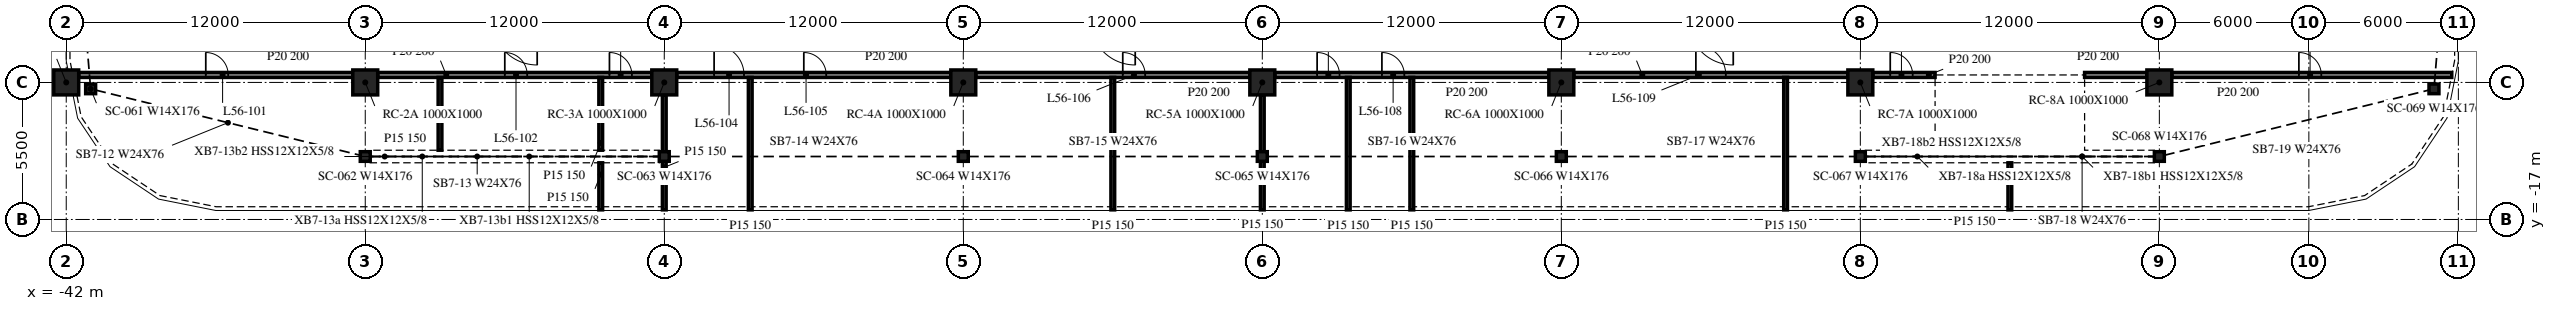
"""IFC4 building model, lengths in metres.
Left out: names, types, materials, properties, quantities, classifications, styles, units other than length and angle.
Written with IfcOpenShell. Run it as: python <this file> out.ifc"""

import sys

from ifc_helpers import new_model, si_unit, direction, frame, frame_2d, origin, origin_2d, place, context, subcontext, project, spatial, rectangle, i_section, extrude, element, fill, save


model = new_model("IFC4")
c1 = context("Model", 3, precision=1e-05, world=origin(), true_north=direction((0.0, 1.0)))
c2 = subcontext(c1, "Body", "Model", "MODEL_VIEW")
j1 = project(units=[si_unit("LENGTHUNIT", "METRE"), si_unit("PLANEANGLEUNIT", "RADIAN")], contexts=[c1])
p1 = place(None, origin())
s1 = spatial("IfcSite", under=j1, at=p1, CompositionType="ELEMENT")
p2 = place(p1, origin())
s2 = spatial("IfcBuilding", under=s1, at=p2, CompositionType="ELEMENT")
p3 = place(p2, frame((0.0, 0.0, 232.4)))
s3 = spatial("IfcBuildingStorey", under=s2, at=p3, CompositionType="ELEMENT", Elevation=232.4)
for number, where, z_axis, x_axis in (
    (1, (-42.0, -11.5, -0.34), (0.0, 0.0, 1.0), (1.0, 0.0, 0.0)),
    (2, (-30.0, -11.5, -0.34), (0.0, 0.0, 1.0), (1.0, 0.0, 0.0)),
    (3, (-18.0, -11.5, -0.34), (0.0, 0.0, 1.0), (1.0, 0.0, 0.0)),
    (4, (-6.0, -11.5, -0.34), (0.0, 0.0, 1.0), (1.0, 0.0, 0.0)),
    (5, (6.0, -11.5, -0.34), (0.0, 0.0, 1.0), (1.0, 0.0, 0.0)),
    (6, (18.0, -11.5, -0.34), (0.0, 0.0, 1.0), (1.0, 0.0, 0.0)),
    (7, (30.0, -11.5, -0.34), (0.0, 0.0, 1.0), (1.0, 0.0, 0.0)),
    (8, (42.0, -11.5, -0.34), (0.0, 0.0, 1.0), (1.0, 0.0, 0.0)),
):
    element("IfcColumn", number, at=place(p3, frame(where, z_axis=z_axis, x_axis=x_axis)), inside=s3, PredefinedType="COLUMN", context=c2, shape_type="SweptSolid", body=[
        extrude(rectangle(XDim=1.0, YDim=1.0, at=origin_2d()), origin(), (0.0, 0.0, 1.0), 3.8),
    ])
for number, where, z_axis, x_axis in (
    (9, (-41.021, -11.758, -0.34), (0.0, 0.0, 1.0), (1.0, 0.0, 0.0)),
    (10, (-30.0, -14.473, -0.34), (0.0, 0.0, 1.0), (1.0, 0.0, 0.0)),
    (11, (-18.0, -14.473, -0.34), (0.0, 0.0, 1.0), (1.0, 0.0, 0.0)),
    (12, (-6.0, -14.473, -0.34), (0.0, 0.0, 1.0), (1.0, 0.0, 0.0)),
    (13, (6.0, -14.473, -0.34), (0.0, 0.0, 1.0), (1.0, 0.0, 0.0)),
    (14, (18.0, -14.473, -0.34), (0.0, 0.0, 1.0), (1.0, 0.0, 0.0)),
    (15, (30.0, -14.473, -0.34), (0.0, 0.0, 1.0), (1.0, 0.0, 0.0)),
    (16, (42.0, -14.473, -0.34), (0.0, 0.0, 1.0), (1.0, 0.0, 0.0)),
    (17, (53.021, -11.758, -0.34), (0.0, 0.0, 1.0), (1.0, 0.0, 0.0)),
):
    element("IfcColumn", number, at=place(p3, frame(where, z_axis=z_axis, x_axis=x_axis)), inside=s3, PredefinedType="COLUMN", context=c2, shape_type="SweptSolid", body=[
        extrude(i_section(OverallWidth=0.399, OverallDepth=0.386, WebThickness=0.021, FlangeThickness=0.033, at=origin_2d()), origin(), (0.0, 0.0, 1.0), 3.8),
    ])
p4 = place(p3, frame((-41.5, -11.2, 0.0), z_axis=(0.0, 0.0, 1.0), x_axis=(1.0, 0.0, 0.0)))
e18 = element("IfcWall", 18, at=p4, inside=s3, PredefinedType="PARTITIONING", context=c2, shape_type="SweptSolid", body=[
    extrude(rectangle(XDim=11.0, YDim=0.2, at=frame_2d((5.5, 0.0))), origin(), (0.0, 0.0, 1.0), 3.46),
])
p5 = place(p4, frame((5.1, 0.0, 0.0)))
e19 = element("IfcOpeningElement", 19, at=p5, cuts=e18, PredefinedType="OPENING", context=c2, shape_type="SweptSolid", body=[
    extrude(rectangle(XDim=0.9, YDim=2.1, at=frame_2d((0.45, 1.05))), frame((0.0, 0.11, 0.0), z_axis=(0.0, -1.0, 0.0), x_axis=(1.0, 0.0, 0.0)), (0.0, 0.0, 1.0), 0.22),
])
p6 = place(p3, frame((-29.5, -11.2, 0.0), z_axis=(0.0, 0.0, 1.0), x_axis=(1.0, 0.0, 0.0)))
e20 = element("IfcWall", 20, at=p6, inside=s3, PredefinedType="PARTITIONING", context=c2, shape_type="SweptSolid", body=[
    extrude(rectangle(XDim=11.0, YDim=0.2, at=frame_2d((5.5, 0.0))), origin(), (0.0, 0.0, 1.0), 3.46),
])
p7 = place(p6, frame((5.1, 0.0, 0.0)))
e21 = element("IfcOpeningElement", 21, at=p7, cuts=e20, PredefinedType="OPENING", context=c2, shape_type="SweptSolid", body=[
    extrude(rectangle(XDim=0.9, YDim=2.1, at=frame_2d((0.45, 1.05))), frame((0.0, 0.11, 0.0), z_axis=(0.0, -1.0, 0.0), x_axis=(1.0, 0.0, 0.0)), (0.0, 0.0, 1.0), 0.22),
])
p8 = place(p6, frame((9.3, 0.0, 0.0)))
e22 = element("IfcOpeningElement", 22, at=p8, cuts=e20, PredefinedType="OPENING", context=c2, shape_type="SweptSolid", body=[
    extrude(rectangle(XDim=0.9, YDim=2.1, at=frame_2d((0.45, 1.05))), frame((0.0, 0.11, 0.0), z_axis=(0.0, -1.0, 0.0), x_axis=(1.0, 0.0, 0.0)), (0.0, 0.0, 1.0), 0.22),
])
p9 = place(p3, frame((-17.5, -11.2, 0.0), z_axis=(0.0, 0.0, 1.0), x_axis=(1.0, 0.0, 0.0)))
e23 = element("IfcWall", 23, at=p9, inside=s3, PredefinedType="PARTITIONING", context=c2, shape_type="SweptSolid", body=[
    extrude(rectangle(XDim=11.0, YDim=0.2, at=frame_2d((5.5, 0.0))), origin(), (0.0, 0.0, 1.0), 3.46),
])
p10 = place(p9, frame((1.5, 0.0, 0.0)))
e24 = element("IfcOpeningElement", 24, at=p10, cuts=e23, PredefinedType="OPENING", context=c2, shape_type="SweptSolid", body=[
    extrude(rectangle(XDim=1.2, YDim=2.1, at=frame_2d((0.6, 1.05))), frame((0.0, 0.11, 0.0), z_axis=(0.0, -1.0, 0.0), x_axis=(1.0, 0.0, 0.0)), (0.0, 0.0, 1.0), 0.22),
])
p11 = place(p9, frame((5.1, 0.0, 0.0)))
e25 = element("IfcOpeningElement", 25, at=p11, cuts=e23, PredefinedType="OPENING", context=c2, shape_type="SweptSolid", body=[
    extrude(rectangle(XDim=0.9, YDim=2.1, at=frame_2d((0.45, 1.05))), frame((0.0, 0.11, 0.0), z_axis=(0.0, -1.0, 0.0), x_axis=(1.0, 0.0, 0.0)), (0.0, 0.0, 1.0), 0.22),
])
p12 = place(p3, frame((-5.5, -11.2, 0.0), z_axis=(0.0, 0.0, 1.0), x_axis=(1.0, 0.0, 0.0)))
e26 = element("IfcWall", 26, at=p12, inside=s3, PredefinedType="PARTITIONING", context=c2, shape_type="SweptSolid", body=[
    extrude(rectangle(XDim=11.0, YDim=0.2, at=frame_2d((5.5, 0.0))), origin(), (0.0, 0.0, 1.0), 3.46),
])
p13 = place(p12, frame((5.9, 0.0, 0.0)))
e27 = element("IfcOpeningElement", 27, at=p13, cuts=e26, PredefinedType="OPENING", context=c2, shape_type="SweptSolid", body=[
    extrude(rectangle(XDim=0.9, YDim=2.1, at=frame_2d((0.45, 1.05))), frame((0.0, 0.11, 0.0), z_axis=(0.0, -1.0, 0.0), x_axis=(1.0, 0.0, 0.0)), (0.0, 0.0, 1.0), 0.22),
])
p14 = place(p3, frame((6.5, -11.2, 0.0), z_axis=(0.0, 0.0, 1.0), x_axis=(1.0, 0.0, 0.0)))
e28 = element("IfcWall", 28, at=p14, inside=s3, PredefinedType="PARTITIONING", context=c2, shape_type="SweptSolid", body=[
    extrude(rectangle(XDim=11.0, YDim=0.2, at=frame_2d((5.5, 0.0))), origin(), (0.0, 0.0, 1.0), 3.46),
])
p15 = place(p14, frame((1.7, 0.0, 0.0)))
e29 = element("IfcOpeningElement", 29, at=p15, cuts=e28, PredefinedType="OPENING", context=c2, shape_type="SweptSolid", body=[
    extrude(rectangle(XDim=0.9, YDim=2.1, at=frame_2d((0.45, 1.05))), frame((0.0, 0.11, 0.0), z_axis=(0.0, -1.0, 0.0), x_axis=(1.0, 0.0, 0.0)), (0.0, 0.0, 1.0), 0.22),
])
p16 = place(p14, frame((4.3, 0.0, 0.0)))
e30 = element("IfcOpeningElement", 30, at=p16, cuts=e28, PredefinedType="OPENING", context=c2, shape_type="SweptSolid", body=[
    extrude(rectangle(XDim=0.9, YDim=2.1, at=frame_2d((0.45, 1.05))), frame((0.0, 0.11, 0.0), z_axis=(0.0, -1.0, 0.0), x_axis=(1.0, 0.0, 0.0)), (0.0, 0.0, 1.0), 0.22),
])
p17 = place(p3, frame((18.5, -11.2, 0.0), z_axis=(0.0, 0.0, 1.0), x_axis=(1.0, 0.0, 0.0)))
e31 = element("IfcWall", 31, at=p17, inside=s3, PredefinedType="PARTITIONING", context=c2, shape_type="SweptSolid", body=[
    extrude(rectangle(XDim=11.0, YDim=0.2, at=frame_2d((5.5, 0.0))), origin(), (0.0, 0.0, 1.0), 3.46),
])
p18 = place(p17, frame((4.9, 0.0, 0.0)))
e32 = element("IfcOpeningElement", 32, at=p18, cuts=e31, PredefinedType="OPENING", context=c2, shape_type="SweptSolid", body=[
    extrude(rectangle(XDim=1.2, YDim=2.1, at=frame_2d((0.6, 1.05))), frame((0.0, 0.11, 0.0), z_axis=(0.0, -1.0, 0.0), x_axis=(1.0, 0.0, 0.0)), (0.0, 0.0, 1.0), 0.22),
])
p19 = place(p3, frame((30.5, -11.2, 0.0), z_axis=(0.0, 0.0, 1.0), x_axis=(1.0, 0.0, 0.0)))
e33 = element("IfcWall", 33, at=p19, inside=s3, PredefinedType="PARTITIONING", context=c2, shape_type="SweptSolid", body=[
    extrude(rectangle(XDim=2.5, YDim=0.2, at=frame_2d((1.25, 0.0))), origin(), (0.0, 0.0, 1.0), 3.46),
])
p20 = place(p19, frame((0.7, 0.0, 0.0)))
e34 = element("IfcOpeningElement", 34, at=p20, cuts=e33, PredefinedType="OPENING", context=c2, shape_type="SweptSolid", body=[
    extrude(rectangle(XDim=0.9, YDim=2.1, at=frame_2d((0.45, 1.05))), frame((0.0, 0.11, 0.0), z_axis=(0.0, -1.0, 0.0), x_axis=(1.0, 0.0, 0.0)), (0.0, 0.0, 1.0), 0.22),
])
p21 = place(p3, frame((39.0, -11.2, 0.0), z_axis=(0.0, 0.0, 1.0), x_axis=(1.0, 0.0, 0.0)))
e35 = element("IfcWall", 35, at=p21, inside=s3, PredefinedType="PARTITIONING", context=c2, shape_type="SweptSolid", body=[
    extrude(rectangle(XDim=2.5, YDim=0.2, at=frame_2d((1.25, 0.0))), origin(), (0.0, 0.0, 1.0), 3.46),
])
p22 = place(p3, frame((42.5, -11.2, 0.0), z_axis=(0.0, 0.0, 1.0), x_axis=(1.0, 0.0, 0.0)))
e36 = element("IfcWall", 36, at=p22, inside=s3, PredefinedType="PARTITIONING", context=c2, shape_type="SweptSolid", body=[
    extrude(rectangle(XDim=11.235, YDim=0.2, at=frame_2d((5.618, 0.0))), origin(), (0.0, 0.0, 1.0), 3.46),
])
p23 = place(p22, frame((5.1, 0.0, 0.0)))
e37 = element("IfcOpeningElement", 37, at=p23, cuts=e36, PredefinedType="OPENING", context=c2, shape_type="SweptSolid", body=[
    extrude(rectangle(XDim=0.9, YDim=2.1, at=frame_2d((0.45, 1.05))), frame((0.0, 0.11, 0.0), z_axis=(0.0, -1.0, 0.0), x_axis=(1.0, 0.0, 0.0)), (0.0, 0.0, 1.0), 0.22),
])
p24 = place(p3, frame((-27.0, -14.221, 0.0), z_axis=(0.0, 0.0, 1.0), x_axis=(0.0, 1.0, 0.0)))
e38 = element("IfcWall", 38, at=p24, inside=s3, PredefinedType="PARTITIONING", context=c2, shape_type="SweptSolid", body=[
    extrude(rectangle(XDim=2.921, YDim=0.15, at=frame_2d((1.46, 0.0))), origin(), (0.0, 0.0, 1.0), 3.46),
])
p25 = place(p3, frame((-20.55, -16.614, 0.0), z_axis=(0.0, 0.0, 1.0), x_axis=(0.0, 1.0, 0.0)))
e39 = element("IfcWall", 39, at=p25, inside=s3, PredefinedType="PARTITIONING", context=c2, shape_type="SweptSolid", body=[
    extrude(rectangle(XDim=1.889, YDim=0.15, at=frame_2d((0.944, 0.0))), origin(), (0.0, 0.0, 1.0), 3.46),
])
p26 = place(p3, frame((-20.55, -14.221, 0.0), z_axis=(0.0, 0.0, 1.0), x_axis=(0.0, 1.0, 0.0)))
e40 = element("IfcWall", 40, at=p26, inside=s3, PredefinedType="PARTITIONING", context=c2, shape_type="SweptSolid", body=[
    extrude(rectangle(XDim=2.921, YDim=0.15, at=frame_2d((1.46, 0.0))), origin(), (0.0, 0.0, 1.0), 3.46),
])
p27 = place(p3, frame((-18.0, -16.614, 0.0), z_axis=(0.0, 0.0, 1.0), x_axis=(0.0, 1.0, 0.0)))
e41 = element("IfcWall", 41, at=p27, inside=s3, PredefinedType="PARTITIONING", context=c2, shape_type="SweptSolid", body=[
    extrude(rectangle(XDim=4.614, YDim=0.15, at=frame_2d((2.307, 0.0))), origin(), (0.0, 0.0, 1.0), 3.46),
])
for number, where, z_axis, x_axis in (
    (42, (-14.55, -16.614, 0.0), (0.0, 0.0, 1.0), (0.0, 1.0, 0.0)),
    (43, (0.0, -16.614, 0.0), (0.0, 0.0, 1.0), (0.0, 1.0, 0.0)),
):
    element("IfcWall", number, at=place(p3, frame(where, z_axis=z_axis, x_axis=x_axis)), inside=s3, PredefinedType="PARTITIONING", context=c2, shape_type="SweptSolid", body=[
        extrude(rectangle(XDim=5.314, YDim=0.15, at=frame_2d((2.657, 0.0))), origin(), (0.0, 0.0, 1.0), 3.46),
    ])
p28 = place(p3, frame((6.0, -16.614, 0.0), z_axis=(0.0, 0.0, 1.0), x_axis=(0.0, 1.0, 0.0)))
e44 = element("IfcWall", 44, at=p28, inside=s3, PredefinedType="PARTITIONING", context=c2, shape_type="SweptSolid", body=[
    extrude(rectangle(XDim=4.614, YDim=0.15, at=frame_2d((2.307, 0.0))), origin(), (0.0, 0.0, 1.0), 3.46),
])
for number, where, z_axis, x_axis in (
    (45, (9.45, -16.614, 0.0), (0.0, 0.0, 1.0), (0.0, 1.0, 0.0)),
    (46, (12.0, -16.614, 0.0), (0.0, 0.0, 1.0), (0.0, 1.0, 0.0)),
    (47, (27.0, -16.614, 0.0), (0.0, 0.0, 1.0), (0.0, 1.0, 0.0)),
):
    element("IfcWall", number, at=place(p3, frame(where, z_axis=z_axis, x_axis=x_axis)), inside=s3, PredefinedType="PARTITIONING", context=c2, shape_type="SweptSolid", body=[
        extrude(rectangle(XDim=5.314, YDim=0.15, at=frame_2d((2.657, 0.0))), origin(), (0.0, 0.0, 1.0), 3.46),
    ])
p29 = place(p3, frame((36.0, -16.614, 0.0), z_axis=(0.0, 0.0, 1.0), x_axis=(0.0, 1.0, 0.0)))
e48 = element("IfcWall", 48, at=p29, inside=s3, PredefinedType="PARTITIONING", context=c2, shape_type="SweptSolid", body=[
    extrude(rectangle(XDim=1.889, YDim=0.15, at=frame_2d((0.944, 0.0))), origin(), (0.0, 0.0, 1.0), 3.46),
])
p30 = place(p5, origin())
e49 = element("IfcDoor", 49, at=p30, inside=s3, OperationType="SINGLE_SWING_LEFT", PredefinedType="DOOR", context=c2, shape_type="SweptSolid", body=[
    extrude(rectangle(XDim=0.9, YDim=2.1, at=frame_2d((0.45, 1.05))), frame((0.0, 0.025, 0.0), z_axis=(0.0, -1.0, 0.0), x_axis=(1.0, 0.0, 0.0)), (0.0, 0.0, 1.0), 0.05),
])
fill(e19, e49)
p31 = place(p7, origin())
e50 = element("IfcDoor", 50, at=p31, inside=s3, OperationType="SINGLE_SWING_LEFT", PredefinedType="DOOR", context=c2, shape_type="SweptSolid", body=[
    extrude(rectangle(XDim=0.9, YDim=2.1, at=frame_2d((0.45, 1.05))), frame((0.0, 0.025, 0.0), z_axis=(0.0, -1.0, 0.0), x_axis=(1.0, 0.0, 0.0)), (0.0, 0.0, 1.0), 0.05),
])
fill(e21, e50)
p32 = place(p8, origin())
e51 = element("IfcDoor", 51, at=p32, inside=s3, OperationType="SINGLE_SWING_LEFT", PredefinedType="DOOR", context=c2, shape_type="SweptSolid", body=[
    extrude(rectangle(XDim=0.9, YDim=2.1, at=frame_2d((0.45, 1.05))), frame((0.0, 0.025, 0.0), z_axis=(0.0, -1.0, 0.0), x_axis=(1.0, 0.0, 0.0)), (0.0, 0.0, 1.0), 0.05),
])
fill(e22, e51)
p33 = place(p10, origin())
e52 = element("IfcDoor", 52, at=p33, inside=s3, OperationType="SINGLE_SWING_RIGHT", PredefinedType="DOOR", context=c2, shape_type="SweptSolid", body=[
    extrude(rectangle(XDim=1.2, YDim=2.1, at=frame_2d((0.6, 1.05))), frame((0.0, 0.025, 0.0), z_axis=(0.0, -1.0, 0.0), x_axis=(1.0, 0.0, 0.0)), (0.0, 0.0, 1.0), 0.05),
])
fill(e24, e52)
p34 = place(p11, origin())
e53 = element("IfcDoor", 53, at=p34, inside=s3, OperationType="SINGLE_SWING_LEFT", PredefinedType="DOOR", context=c2, shape_type="SweptSolid", body=[
    extrude(rectangle(XDim=0.9, YDim=2.1, at=frame_2d((0.45, 1.05))), frame((0.0, 0.025, 0.0), z_axis=(0.0, -1.0, 0.0), x_axis=(1.0, 0.0, 0.0)), (0.0, 0.0, 1.0), 0.05),
])
fill(e25, e53)
p35 = place(p13, origin())
e54 = element("IfcDoor", 54, at=p35, inside=s3, OperationType="SINGLE_SWING_LEFT", PredefinedType="DOOR", context=c2, shape_type="SweptSolid", body=[
    extrude(rectangle(XDim=0.9, YDim=2.1, at=frame_2d((0.45, 1.05))), frame((0.0, 0.025, 0.0), z_axis=(0.0, -1.0, 0.0), x_axis=(1.0, 0.0, 0.0)), (0.0, 0.0, 1.0), 0.05),
])
fill(e27, e54)
p36 = place(p15, origin())
e55 = element("IfcDoor", 55, at=p36, inside=s3, OperationType="SINGLE_SWING_RIGHT", PredefinedType="DOOR", context=c2, shape_type="SweptSolid", body=[
    extrude(rectangle(XDim=0.9, YDim=2.1, at=frame_2d((0.45, 1.05))), frame((0.0, 0.025, 0.0), z_axis=(0.0, -1.0, 0.0), x_axis=(1.0, 0.0, 0.0)), (0.0, 0.0, 1.0), 0.05),
])
fill(e29, e55)
p37 = place(p16, origin())
e56 = element("IfcDoor", 56, at=p37, inside=s3, OperationType="SINGLE_SWING_RIGHT", PredefinedType="DOOR", context=c2, shape_type="SweptSolid", body=[
    extrude(rectangle(XDim=0.9, YDim=2.1, at=frame_2d((0.45, 1.05))), frame((0.0, 0.025, 0.0), z_axis=(0.0, -1.0, 0.0), x_axis=(1.0, 0.0, 0.0)), (0.0, 0.0, 1.0), 0.05),
])
fill(e30, e56)
p38 = place(p18, origin())
e57 = element("IfcDoor", 57, at=p38, inside=s3, OperationType="SINGLE_SWING_LEFT", PredefinedType="DOOR", context=c2, shape_type="SweptSolid", body=[
    extrude(rectangle(XDim=1.2, YDim=2.1, at=frame_2d((0.6, 1.05))), frame((0.0, 0.025, 0.0), z_axis=(0.0, -1.0, 0.0), x_axis=(1.0, 0.0, 0.0)), (0.0, 0.0, 1.0), 0.05),
])
fill(e32, e57)
p39 = place(p20, origin())
e58 = element("IfcDoor", 58, at=p39, inside=s3, OperationType="SINGLE_SWING_RIGHT", PredefinedType="DOOR", context=c2, shape_type="SweptSolid", body=[
    extrude(rectangle(XDim=0.9, YDim=2.1, at=frame_2d((0.45, 1.05))), frame((0.0, 0.025, 0.0), z_axis=(0.0, -1.0, 0.0), x_axis=(1.0, 0.0, 0.0)), (0.0, 0.0, 1.0), 0.05),
])
fill(e34, e58)
p40 = place(p23, origin())
e59 = element("IfcDoor", 59, at=p40, inside=s3, OperationType="SINGLE_SWING_RIGHT", PredefinedType="DOOR", context=c2, shape_type="SweptSolid", body=[
    extrude(rectangle(XDim=0.9, YDim=2.1, at=frame_2d((0.45, 1.05))), frame((0.0, 0.025, 0.0), z_axis=(0.0, -1.0, 0.0), x_axis=(1.0, 0.0, 0.0)), (0.0, 0.0, 1.0), 0.05),
])
fill(e37, e59)
save(model, sys.argv[1])
